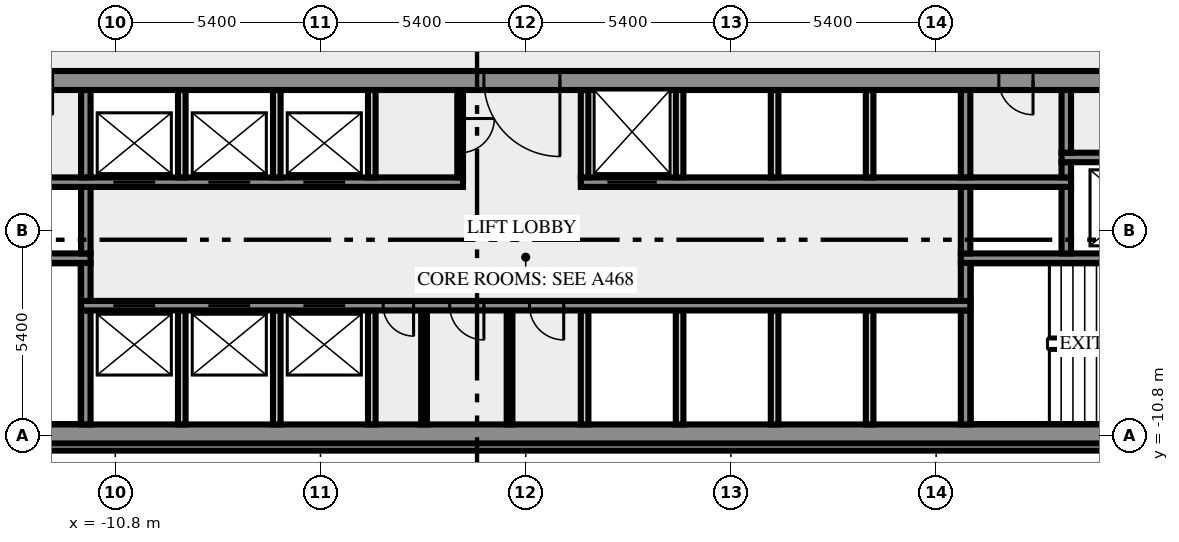
"""IFC4 building model, lengths in metres.
Left out: names, types, materials, properties, quantities, classifications, styles, units other than length and angle.
Written with IfcOpenShell. Run it as: python <this file> out.ifc"""

import sys

from ifc_helpers import new_model, si_unit, direction, frame, frame_2d, origin, place, context, subcontext, project, spatial, rectangle, extrude, element, fill, save


model = new_model("IFC4")
c1 = context("Model", 3, precision=1e-05, world=origin(), true_north=direction((0.0, 1.0)))
c2 = subcontext(c1, "Body", "Model", "MODEL_VIEW")
j1 = project(units=[si_unit("LENGTHUNIT", "METRE"), si_unit("PLANEANGLEUNIT", "RADIAN")], contexts=[c1])
p1 = place(None, origin())
s1 = spatial("IfcSite", under=j1, at=p1, CompositionType="ELEMENT")
p2 = place(p1, origin())
s2 = spatial("IfcBuilding", under=s1, at=p2, CompositionType="ELEMENT")
p3 = place(p2, frame((0.0, 0.0, 101.0)))
s3 = spatial("IfcBuildingStorey", under=s2, at=p3, CompositionType="ELEMENT", Elevation=101.0)
p4 = place(p3, frame((-17.444, -11.088, 0.0), z_axis=(0.0, 0.0, 1.0), x_axis=(1.0, 0.0, 0.0)))
e1 = element("IfcWall", 1, at=p4, inside=s3, PredefinedType="SOLIDWALL", context=c2, shape_type="SweptSolid", body=[
    extrude(rectangle(XDim=34.888, YDim=0.2, at=frame_2d((17.444, 0.0))), origin(), (0.0, 0.0, 1.0), 3.65),
])
p5 = place(p3, frame((-20.0, -10.75, 0.0), z_axis=(0.0, 0.0, 1.0), x_axis=(1.0, 0.0, 0.0)))
e2 = element("IfcWall", 2, at=p5, inside=s3, PredefinedType="SHEAR", context=c2, shape_type="SweptSolid", body=[
    extrude(rectangle(XDim=40.0, YDim=0.5, at=frame_2d((20.0, 0.0))), origin(), (0.0, 0.0, 1.0), 3.65),
])
p6 = place(p5, frame((0.8, 0.0, 1.0)))
e3 = element("IfcOpeningElement", 3, at=p6, cuts=e2, PredefinedType="OPENING", context=c2, shape_type="SweptSolid", body=[
    extrude(rectangle(XDim=1.2, YDim=1.2, at=frame_2d((0.6, 0.6))), frame((0.0, 0.26, 0.0), z_axis=(0.0, -1.0, 0.0), x_axis=(1.0, 0.0, 0.0)), (0.0, 0.0, 1.0), 0.52),
])
p7 = place(p5, frame((38.0, 0.0, 1.0)))
e4 = element("IfcOpeningElement", 4, at=p7, cuts=e2, PredefinedType="OPENING", context=c2, shape_type="SweptSolid", body=[
    extrude(rectangle(XDim=1.2, YDim=1.2, at=frame_2d((0.6, 0.6))), frame((0.0, 0.26, 0.0), z_axis=(0.0, -1.0, 0.0), x_axis=(1.0, 0.0, 0.0)), (0.0, 0.0, 1.0), 0.52),
])
p8 = place(p3, frame((-11.575, -10.5, 0.0), z_axis=(0.0, 0.0, 1.0), x_axis=(0.0, 1.0, 0.0)))
e5 = element("IfcWall", 5, at=p8, inside=s3, PredefinedType="SHEAR", context=c2, shape_type="SweptSolid", body=[
    extrude(rectangle(XDim=3.0, YDim=0.25, at=frame_2d((1.5, 0.0))), origin(), (0.0, 0.0, 1.0), 3.65),
])
for number, where, z_axis, x_axis in (
    (6, (-9.05, -10.5, 0.0), (0.0, 0.0, 1.0), (0.0, 1.0, 0.0)),
    (7, (-6.55, -10.5, 0.0), (0.0, 0.0, 1.0), (0.0, 1.0, 0.0)),
    (8, (-4.05, -10.5, 0.0), (0.0, 0.0, 1.0), (0.0, 1.0, 0.0)),
):
    element("IfcWall", number, at=place(p3, frame(where, z_axis=z_axis, x_axis=x_axis)), inside=s3, PredefinedType="SOLIDWALL", context=c2, shape_type="SweptSolid", body=[
        extrude(rectangle(XDim=3.0, YDim=0.2, at=frame_2d((1.5, 0.0))), origin(), (0.0, 0.0, 1.0), 3.65),
    ])
for number, where, z_axis, x_axis in (
    (9, (-2.675, -10.5, 0.0), (0.0, 0.0, 1.0), (0.0, 1.0, 0.0)),
    (10, (-0.425, -10.5, 0.0), (0.0, 0.0, 1.0), (0.0, 1.0, 0.0)),
):
    element("IfcWall", number, at=place(p3, frame(where, z_axis=z_axis, x_axis=x_axis)), inside=s3, PredefinedType="PARTITIONING", context=c2, shape_type="SweptSolid", body=[
        extrude(rectangle(XDim=3.0, YDim=0.15, at=frame_2d((1.5, 0.0))), origin(), (0.0, 0.0, 1.0), 3.65),
    ])
for number, where, z_axis, x_axis in (
    (11, (1.55, -10.5, 0.0), (0.0, 0.0, 1.0), (0.0, 1.0, 0.0)),
    (12, (4.05, -10.5, 0.0), (0.0, 0.0, 1.0), (0.0, 1.0, 0.0)),
    (13, (6.55, -10.5, 0.0), (0.0, 0.0, 1.0), (0.0, 1.0, 0.0)),
    (14, (9.05, -10.5, 0.0), (0.0, 0.0, 1.0), (0.0, 1.0, 0.0)),
):
    element("IfcWall", number, at=place(p3, frame(where, z_axis=z_axis, x_axis=x_axis)), inside=s3, PredefinedType="SOLIDWALL", context=c2, shape_type="SweptSolid", body=[
        extrude(rectangle(XDim=3.0, YDim=0.2, at=frame_2d((1.5, 0.0))), origin(), (0.0, 0.0, 1.0), 3.65),
    ])
p9 = place(p3, frame((11.575, -10.5, 0.0), z_axis=(0.0, 0.0, 1.0), x_axis=(0.0, 1.0, 0.0)))
e15 = element("IfcWall", 15, at=p9, inside=s3, PredefinedType="SHEAR", context=c2, shape_type="SweptSolid", body=[
    extrude(rectangle(XDim=3.0, YDim=0.25, at=frame_2d((1.5, 0.0))), origin(), (0.0, 0.0, 1.0), 3.65),
])
p10 = place(p3, frame((11.7, -7.375, 0.0), z_axis=(0.0, 0.0, 1.0), x_axis=(-1.0, 0.0, 0.0)))
e16 = element("IfcWall", 16, at=p10, inside=s3, PredefinedType="SHEAR", context=c2, shape_type="SweptSolid", body=[
    extrude(rectangle(XDim=23.4, YDim=0.25, at=frame_2d((11.7, 0.0))), origin(), (0.0, 0.0, 1.0), 3.65),
])
p11 = place(p10, frame((21.45, 0.0, 0.0)))
e17 = element("IfcOpeningElement", 17, at=p11, cuts=e16, PredefinedType="OPENING", context=c2, shape_type="SweptSolid", body=[
    extrude(rectangle(XDim=1.1, YDim=2.1, at=frame_2d((0.55, 1.05))), frame((0.0, 0.135, 0.0), z_axis=(0.0, -1.0, 0.0), x_axis=(1.0, 0.0, 0.0)), (0.0, 0.0, 1.0), 0.27),
])
p12 = place(p10, frame((18.95, 0.0, 0.0)))
e18 = element("IfcOpeningElement", 18, at=p12, cuts=e16, PredefinedType="OPENING", context=c2, shape_type="SweptSolid", body=[
    extrude(rectangle(XDim=1.1, YDim=2.1, at=frame_2d((0.55, 1.05))), frame((0.0, 0.135, 0.0), z_axis=(0.0, -1.0, 0.0), x_axis=(1.0, 0.0, 0.0)), (0.0, 0.0, 1.0), 0.27),
])
p13 = place(p10, frame((16.45, 0.0, 0.0)))
e19 = element("IfcOpeningElement", 19, at=p13, cuts=e16, PredefinedType="OPENING", context=c2, shape_type="SweptSolid", body=[
    extrude(rectangle(XDim=1.1, YDim=2.1, at=frame_2d((0.55, 1.05))), frame((0.0, 0.135, 0.0), z_axis=(0.0, -1.0, 0.0), x_axis=(1.0, 0.0, 0.0)), (0.0, 0.0, 1.0), 0.27),
])
p14 = place(p10, frame((14.65, 0.0, 0.0)))
e20 = element("IfcOpeningElement", 20, at=p14, cuts=e16, PredefinedType="OPENING", context=c2, shape_type="SweptSolid", body=[
    extrude(rectangle(XDim=0.8, YDim=2.1, at=frame_2d((0.4, 1.05))), frame((0.0, 0.135, 0.0), z_axis=(0.0, -1.0, 0.0), x_axis=(1.0, 0.0, 0.0)), (0.0, 0.0, 1.0), 0.27),
])
p15 = place(p10, frame((12.8, 0.0, 0.0)))
e21 = element("IfcOpeningElement", 21, at=p15, cuts=e16, PredefinedType="OPENING", context=c2, shape_type="SweptSolid", body=[
    extrude(rectangle(XDim=0.9, YDim=2.1, at=frame_2d((0.45, 1.05))), frame((0.0, 0.135, 0.0), z_axis=(0.0, -1.0, 0.0), x_axis=(1.0, 0.0, 0.0)), (0.0, 0.0, 1.0), 0.27),
])
p16 = place(p10, frame((10.7, 0.0, 0.0)))
e22 = element("IfcOpeningElement", 22, at=p16, cuts=e16, PredefinedType="OPENING", context=c2, shape_type="SweptSolid", body=[
    extrude(rectangle(XDim=0.9, YDim=2.1, at=frame_2d((0.45, 1.05))), frame((0.0, 0.135, 0.0), z_axis=(0.0, -1.0, 0.0), x_axis=(1.0, 0.0, 0.0)), (0.0, 0.0, 1.0), 0.27),
])
for number, where, z_axis, x_axis in (
    (23, (-11.575, -7.25, 0.0), (0.0, 0.0, 1.0), (0.0, 1.0, 0.0)),
    (24, (11.575, -7.25, 0.0), (0.0, 0.0, 1.0), (0.0, 1.0, 0.0)),
):
    element("IfcWall", number, at=place(p3, frame(where, z_axis=z_axis, x_axis=x_axis)), inside=s3, PredefinedType="SHEAR", context=c2, shape_type="SweptSolid", body=[
        extrude(rectangle(XDim=1.0, YDim=0.25, at=frame_2d((0.5, 0.0))), origin(), (0.0, 0.0, 1.0), 3.65),
    ])
p17 = place(p3, frame((-11.45, -6.125, 0.0), z_axis=(0.0, 0.0, 1.0), x_axis=(-1.0, 0.0, 0.0)))
e25 = element("IfcWall", 25, at=p17, inside=s3, PredefinedType="SHEAR", context=c2, shape_type="SweptSolid", body=[
    extrude(rectangle(XDim=8.05, YDim=0.25, at=frame_2d((4.025, 0.0))), origin(), (0.0, 0.0, 1.0), 3.65),
])
p18 = place(p17, frame((6.2, 0.0, 0.0)))
e26 = element("IfcOpeningElement", 26, at=p18, cuts=e25, PredefinedType="OPENING", context=c2, shape_type="SweptSolid", body=[
    extrude(rectangle(XDim=1.8, YDim=2.1, at=frame_2d((0.9, 1.05))), frame((0.0, 0.135, 0.0), z_axis=(0.0, -1.0, 0.0), x_axis=(1.0, 0.0, 0.0)), (0.0, 0.0, 1.0), 0.27),
])
p19 = place(p3, frame((19.5, -6.125, 0.0), z_axis=(0.0, 0.0, 1.0), x_axis=(-1.0, 0.0, 0.0)))
e27 = element("IfcWall", 27, at=p19, inside=s3, PredefinedType="SHEAR", context=c2, shape_type="SweptSolid", body=[
    extrude(rectangle(XDim=8.05, YDim=0.25, at=frame_2d((4.025, 0.0))), origin(), (0.0, 0.0, 1.0), 3.65),
])
p20 = place(p19, frame((0.05, 0.0, 0.0)))
e28 = element("IfcOpeningElement", 28, at=p20, cuts=e27, PredefinedType="OPENING", context=c2, shape_type="SweptSolid", body=[
    extrude(rectangle(XDim=1.8, YDim=2.1, at=frame_2d((0.9, 1.05))), frame((0.0, 0.135, 0.0), z_axis=(0.0, -1.0, 0.0), x_axis=(1.0, 0.0, 0.0)), (0.0, 0.0, 1.0), 0.27),
])
for number, where, z_axis, x_axis in (
    (29, (-11.575, -6.0, 0.0), (0.0, 0.0, 1.0), (0.0, 1.0, 0.0)),
    (30, (11.575, -6.0, 0.0), (0.0, 0.0, 1.0), (0.0, 1.0, 0.0)),
    (31, (14.225, -6.0, 0.0), (0.0, 0.0, 1.0), (0.0, 1.0, 0.0)),
):
    element("IfcWall", number, at=place(p3, frame(where, z_axis=z_axis, x_axis=x_axis)), inside=s3, PredefinedType="SHEAR", context=c2, shape_type="SweptSolid", body=[
        extrude(rectangle(XDim=1.75, YDim=0.25, at=frame_2d((0.875, 0.0))), origin(), (0.0, 0.0, 1.0), 3.65),
    ])
p21 = place(p3, frame((-14.35, -4.125, 0.0), z_axis=(0.0, 0.0, 1.0), x_axis=(1.0, 0.0, 0.0)))
e32 = element("IfcWall", 32, at=p21, inside=s3, PredefinedType="SHEAR", context=c2, shape_type="SweptSolid", body=[
    extrude(rectangle(XDim=12.7, YDim=0.25, at=frame_2d((6.35, 0.0))), origin(), (0.0, 0.0, 1.0), 3.65),
])
p22 = place(p21, frame((3.5, 0.0, 0.0)))
e33 = element("IfcOpeningElement", 33, at=p22, cuts=e32, PredefinedType="OPENING", context=c2, shape_type="SweptSolid", body=[
    extrude(rectangle(XDim=1.1, YDim=2.1, at=frame_2d((0.55, 1.05))), frame((0.0, 0.135, 0.0), z_axis=(0.0, -1.0, 0.0), x_axis=(1.0, 0.0, 0.0)), (0.0, 0.0, 1.0), 0.27),
])
p23 = place(p21, frame((6.0, 0.0, 0.0)))
e34 = element("IfcOpeningElement", 34, at=p23, cuts=e32, PredefinedType="OPENING", context=c2, shape_type="SweptSolid", body=[
    extrude(rectangle(XDim=1.1, YDim=2.1, at=frame_2d((0.55, 1.05))), frame((0.0, 0.135, 0.0), z_axis=(0.0, -1.0, 0.0), x_axis=(1.0, 0.0, 0.0)), (0.0, 0.0, 1.0), 0.27),
])
p24 = place(p21, frame((8.5, 0.0, 0.0)))
e35 = element("IfcOpeningElement", 35, at=p24, cuts=e32, PredefinedType="OPENING", context=c2, shape_type="SweptSolid", body=[
    extrude(rectangle(XDim=1.1, YDim=2.1, at=frame_2d((0.55, 1.05))), frame((0.0, 0.135, 0.0), z_axis=(0.0, -1.0, 0.0), x_axis=(1.0, 0.0, 0.0)), (0.0, 0.0, 1.0), 0.27),
])
p25 = place(p3, frame((1.45, -4.125, 0.0), z_axis=(0.0, 0.0, 1.0), x_axis=(1.0, 0.0, 0.0)))
e36 = element("IfcWall", 36, at=p25, inside=s3, PredefinedType="SHEAR", context=c2, shape_type="SweptSolid", body=[
    extrude(rectangle(XDim=12.9, YDim=0.25, at=frame_2d((6.45, 0.0))), origin(), (0.0, 0.0, 1.0), 3.65),
])
p26 = place(p25, frame((0.7, 0.0, 0.0)))
e37 = element("IfcOpeningElement", 37, at=p26, cuts=e36, PredefinedType="OPENING", context=c2, shape_type="SweptSolid", body=[
    extrude(rectangle(XDim=1.3, YDim=2.1, at=frame_2d((0.65, 1.05))), frame((0.0, 0.135, 0.0), z_axis=(0.0, -1.0, 0.0), x_axis=(1.0, 0.0, 0.0)), (0.0, 0.0, 1.0), 0.27),
])
p27 = place(p3, frame((-11.575, -4.0, 0.0), z_axis=(0.0, 0.0, 1.0), x_axis=(0.0, 1.0, 0.0)))
e38 = element("IfcWall", 38, at=p27, inside=s3, PredefinedType="SHEAR", context=c2, shape_type="SweptSolid", body=[
    extrude(rectangle(XDim=2.3, YDim=0.25, at=frame_2d((1.15, 0.0))), origin(), (0.0, 0.0, 1.0), 3.65),
])
for number, where, z_axis, x_axis in (
    (39, (-9.05, -4.0, 0.0), (0.0, 0.0, 1.0), (0.0, 1.0, 0.0)),
    (40, (-6.55, -4.0, 0.0), (0.0, 0.0, 1.0), (0.0, 1.0, 0.0)),
    (41, (-4.05, -4.0, 0.0), (0.0, 0.0, 1.0), (0.0, 1.0, 0.0)),
):
    element("IfcWall", number, at=place(p3, frame(where, z_axis=z_axis, x_axis=x_axis)), inside=s3, PredefinedType="SOLIDWALL", context=c2, shape_type="SweptSolid", body=[
        extrude(rectangle(XDim=2.3, YDim=0.2, at=frame_2d((1.15, 0.0))), origin(), (0.0, 0.0, 1.0), 3.65),
    ])
p28 = place(p3, frame((-1.725, -1.7, 0.0), z_axis=(0.0, 0.0, 1.0), x_axis=(0.0, -1.0, 0.0)))
e42 = element("IfcWall", 42, at=p28, inside=s3, PredefinedType="PARTITIONING", context=c2, shape_type="SweptSolid", body=[
    extrude(rectangle(XDim=2.3, YDim=0.15, at=frame_2d((1.15, 0.0))), origin(), (0.0, 0.0, 1.0), 3.65),
])
p29 = place(p28, frame((0.75, 0.0, 0.0)))
e43 = element("IfcOpeningElement", 43, at=p29, cuts=e42, PredefinedType="OPENING", context=c2, shape_type="SweptSolid", body=[
    extrude(rectangle(XDim=0.9, YDim=2.1, at=frame_2d((0.45, 1.05))), frame((0.0, 0.085, 0.0), z_axis=(0.0, -1.0, 0.0), x_axis=(1.0, 0.0, 0.0)), (0.0, 0.0, 1.0), 0.17),
])
for number, where, z_axis, x_axis in (
    (44, (1.55, -4.0, 0.0), (0.0, 0.0, 1.0), (0.0, 1.0, 0.0)),
    (45, (4.05, -4.0, 0.0), (0.0, 0.0, 1.0), (0.0, 1.0, 0.0)),
    (46, (6.55, -4.0, 0.0), (0.0, 0.0, 1.0), (0.0, 1.0, 0.0)),
    (47, (9.05, -4.0, 0.0), (0.0, 0.0, 1.0), (0.0, 1.0, 0.0)),
):
    element("IfcWall", number, at=place(p3, frame(where, z_axis=z_axis, x_axis=x_axis)), inside=s3, PredefinedType="SOLIDWALL", context=c2, shape_type="SweptSolid", body=[
        extrude(rectangle(XDim=2.3, YDim=0.2, at=frame_2d((1.15, 0.0))), origin(), (0.0, 0.0, 1.0), 3.65),
    ])
p30 = place(p3, frame((11.575, -4.0, 0.0), z_axis=(0.0, 0.0, 1.0), x_axis=(0.0, 1.0, 0.0)))
e48 = element("IfcWall", 48, at=p30, inside=s3, PredefinedType="SHEAR", context=c2, shape_type="SweptSolid", body=[
    extrude(rectangle(XDim=2.3, YDim=0.25, at=frame_2d((1.15, 0.0))), origin(), (0.0, 0.0, 1.0), 3.65),
])
p31 = place(p3, frame((14.225, -4.0, 0.0), z_axis=(0.0, 0.0, 1.0), x_axis=(0.0, 1.0, 0.0)))
e49 = element("IfcWall", 49, at=p31, inside=s3, PredefinedType="SHEAR", context=c2, shape_type="SweptSolid", body=[
    extrude(rectangle(XDim=0.4, YDim=0.25, at=frame_2d((0.2, 0.0))), origin(), (0.0, 0.0, 1.0), 3.65),
])
p32 = place(p3, frame((14.1, -3.475, 0.0), z_axis=(0.0, 0.0, 1.0), x_axis=(1.0, 0.0, 0.0)))
e50 = element("IfcWall", 50, at=p32, inside=s3, PredefinedType="SHEAR", context=c2, shape_type="SweptSolid", body=[
    extrude(rectangle(XDim=3.25, YDim=0.25, at=frame_2d((1.625, 0.0))), origin(), (0.0, 0.0, 1.0), 3.65),
])
p33 = place(p3, frame((14.225, -3.35, 0.0), z_axis=(0.0, 0.0, 1.0), x_axis=(0.0, 1.0, 0.0)))
e51 = element("IfcWall", 51, at=p33, inside=s3, PredefinedType="SHEAR", context=c2, shape_type="SweptSolid", body=[
    extrude(rectangle(XDim=1.65, YDim=0.25, at=frame_2d((0.825, 0.0))), origin(), (0.0, 0.0, 1.0), 3.65),
])
p34 = place(p3, frame((20.49, -1.45, 0.0), z_axis=(0.0, 0.0, 1.0), x_axis=(-1.0, 0.0, 0.0)))
e52 = element("IfcWall", 52, at=p34, inside=s3, PredefinedType="SHEAR", context=c2, shape_type="SweptSolid", body=[
    extrude(rectangle(XDim=40.98, YDim=0.5, at=frame_2d((20.49, 0.0))), origin(), (0.0, 0.0, 1.0), 3.65),
])
p35 = place(p34, frame((38.14, 0.0, 0.0)))
e53 = element("IfcOpeningElement", 53, at=p35, cuts=e52, PredefinedType="OPENING", context=c2, shape_type="SweptSolid", body=[
    extrude(rectangle(XDim=1.8, YDim=2.1, at=frame_2d((0.9, 1.05))), frame((0.0, 0.26, 0.0), z_axis=(0.0, -1.0, 0.0), x_axis=(1.0, 0.0, 0.0)), (0.0, 0.0, 1.0), 0.52),
])
p36 = place(p34, frame((36.728, 0.0, 0.0)))
e54 = element("IfcOpeningElement", 54, at=p36, cuts=e52, PredefinedType="OPENING", context=c2, shape_type="SweptSolid", body=[
    extrude(rectangle(XDim=0.8, YDim=2.1, at=frame_2d((0.4, 1.05))), frame((0.0, 0.26, 0.0), z_axis=(0.0, -1.0, 0.0), x_axis=(1.0, 0.0, 0.0)), (0.0, 0.0, 1.0), 0.52),
])
p37 = place(p34, frame((35.153, 0.0, 0.0)))
e55 = element("IfcOpeningElement", 55, at=p37, cuts=e52, PredefinedType="OPENING", context=c2, shape_type="SweptSolid", body=[
    extrude(rectangle(XDim=0.8, YDim=2.1, at=frame_2d((0.4, 1.05))), frame((0.0, 0.26, 0.0), z_axis=(0.0, -1.0, 0.0), x_axis=(1.0, 0.0, 0.0)), (0.0, 0.0, 1.0), 0.52),
])
p38 = place(p34, frame((32.94, 0.0, 0.0)))
e56 = element("IfcOpeningElement", 56, at=p38, cuts=e52, PredefinedType="OPENING", context=c2, shape_type="SweptSolid", body=[
    extrude(rectangle(XDim=0.9, YDim=2.1, at=frame_2d((0.45, 1.05))), frame((0.0, 0.26, 0.0), z_axis=(0.0, -1.0, 0.0), x_axis=(1.0, 0.0, 0.0)), (0.0, 0.0, 1.0), 0.52),
])
p39 = place(p34, frame((19.59, 0.0, 0.0)))
e57 = element("IfcOpeningElement", 57, at=p39, cuts=e52, PredefinedType="OPENING", context=c2, shape_type="SweptSolid", body=[
    extrude(rectangle(XDim=2.0, YDim=2.1, at=frame_2d((1.0, 1.05))), frame((0.0, 0.26, 0.0), z_axis=(0.0, -1.0, 0.0), x_axis=(1.0, 0.0, 0.0)), (0.0, 0.0, 1.0), 0.52),
])
p40 = place(p34, frame((7.14, 0.0, 0.0)))
e58 = element("IfcOpeningElement", 58, at=p40, cuts=e52, PredefinedType="OPENING", context=c2, shape_type="SweptSolid", body=[
    extrude(rectangle(XDim=0.9, YDim=2.1, at=frame_2d((0.45, 1.05))), frame((0.0, 0.26, 0.0), z_axis=(0.0, -1.0, 0.0), x_axis=(1.0, 0.0, 0.0)), (0.0, 0.0, 1.0), 0.52),
])
p41 = place(p34, frame((4.19, 0.0, 0.0)))
e59 = element("IfcOpeningElement", 59, at=p41, cuts=e52, PredefinedType="OPENING", context=c2, shape_type="SweptSolid", body=[
    extrude(rectangle(XDim=0.9, YDim=2.1, at=frame_2d((0.45, 1.05))), frame((0.0, 0.26, 0.0), z_axis=(0.0, -1.0, 0.0), x_axis=(1.0, 0.0, 0.0)), (0.0, 0.0, 1.0), 0.52),
])
p42 = place(p34, frame((1.04, 0.0, 0.0)))
e60 = element("IfcOpeningElement", 60, at=p42, cuts=e52, PredefinedType="OPENING", context=c2, shape_type="SweptSolid", body=[
    extrude(rectangle(XDim=1.8, YDim=2.1, at=frame_2d((0.9, 1.05))), frame((0.0, 0.26, 0.0), z_axis=(0.0, -1.0, 0.0), x_axis=(1.0, 0.0, 0.0)), (0.0, 0.0, 1.0), 0.52),
])
p43 = place(p11, origin())
e61 = element("IfcDoor", 61, at=p43, inside=s3, OperationType="DOUBLE_DOOR_SLIDING", PredefinedType="DOOR", context=c2, shape_type="SweptSolid", body=[
    extrude(rectangle(XDim=1.1, YDim=2.1, at=frame_2d((0.55, 1.05))), frame((0.0, 0.025, 0.0), z_axis=(0.0, -1.0, 0.0), x_axis=(1.0, 0.0, 0.0)), (0.0, 0.0, 1.0), 0.05),
])
fill(e17, e61)
p44 = place(p12, origin())
e62 = element("IfcDoor", 62, at=p44, inside=s3, OperationType="DOUBLE_DOOR_SLIDING", PredefinedType="DOOR", context=c2, shape_type="SweptSolid", body=[
    extrude(rectangle(XDim=1.1, YDim=2.1, at=frame_2d((0.55, 1.05))), frame((0.0, 0.025, 0.0), z_axis=(0.0, -1.0, 0.0), x_axis=(1.0, 0.0, 0.0)), (0.0, 0.0, 1.0), 0.05),
])
fill(e18, e62)
p45 = place(p13, origin())
e63 = element("IfcDoor", 63, at=p45, inside=s3, OperationType="DOUBLE_DOOR_SLIDING", PredefinedType="DOOR", context=c2, shape_type="SweptSolid", body=[
    extrude(rectangle(XDim=1.1, YDim=2.1, at=frame_2d((0.55, 1.05))), frame((0.0, 0.025, 0.0), z_axis=(0.0, -1.0, 0.0), x_axis=(1.0, 0.0, 0.0)), (0.0, 0.0, 1.0), 0.05),
])
fill(e19, e63)
p46 = place(p14, origin())
e64 = element("IfcDoor", 64, at=p46, inside=s3, OperationType="SINGLE_SWING_RIGHT", PredefinedType="DOOR", context=c2, shape_type="SweptSolid", body=[
    extrude(rectangle(XDim=0.8, YDim=2.1, at=frame_2d((0.4, 1.05))), frame((0.0, 0.025, 0.0), z_axis=(0.0, -1.0, 0.0), x_axis=(1.0, 0.0, 0.0)), (0.0, 0.0, 1.0), 0.05),
])
fill(e20, e64)
p47 = place(p15, origin())
e65 = element("IfcDoor", 65, at=p47, inside=s3, OperationType="SINGLE_SWING_RIGHT", PredefinedType="DOOR", context=c2, shape_type="SweptSolid", body=[
    extrude(rectangle(XDim=0.9, YDim=2.1, at=frame_2d((0.45, 1.05))), frame((0.0, 0.025, 0.0), z_axis=(0.0, -1.0, 0.0), x_axis=(1.0, 0.0, 0.0)), (0.0, 0.0, 1.0), 0.05),
])
fill(e21, e65)
p48 = place(p16, origin())
e66 = element("IfcDoor", 66, at=p48, inside=s3, OperationType="SINGLE_SWING_LEFT", PredefinedType="DOOR", context=c2, shape_type="SweptSolid", body=[
    extrude(rectangle(XDim=0.9, YDim=2.1, at=frame_2d((0.45, 1.05))), frame((0.0, 0.025, 0.0), z_axis=(0.0, -1.0, 0.0), x_axis=(1.0, 0.0, 0.0)), (0.0, 0.0, 1.0), 0.05),
])
fill(e22, e66)
p49 = place(p22, origin())
e67 = element("IfcDoor", 67, at=p49, inside=s3, OperationType="DOUBLE_DOOR_SLIDING", PredefinedType="DOOR", context=c2, shape_type="SweptSolid", body=[
    extrude(rectangle(XDim=1.1, YDim=2.1, at=frame_2d((0.55, 1.05))), frame((0.0, 0.025, 0.0), z_axis=(0.0, -1.0, 0.0), x_axis=(1.0, 0.0, 0.0)), (0.0, 0.0, 1.0), 0.05),
])
fill(e33, e67)
p50 = place(p23, origin())
e68 = element("IfcDoor", 68, at=p50, inside=s3, OperationType="DOUBLE_DOOR_SLIDING", PredefinedType="DOOR", context=c2, shape_type="SweptSolid", body=[
    extrude(rectangle(XDim=1.1, YDim=2.1, at=frame_2d((0.55, 1.05))), frame((0.0, 0.025, 0.0), z_axis=(0.0, -1.0, 0.0), x_axis=(1.0, 0.0, 0.0)), (0.0, 0.0, 1.0), 0.05),
])
fill(e34, e68)
p51 = place(p24, origin())
e69 = element("IfcDoor", 69, at=p51, inside=s3, OperationType="DOUBLE_DOOR_SLIDING", PredefinedType="DOOR", context=c2, shape_type="SweptSolid", body=[
    extrude(rectangle(XDim=1.1, YDim=2.1, at=frame_2d((0.55, 1.05))), frame((0.0, 0.025, 0.0), z_axis=(0.0, -1.0, 0.0), x_axis=(1.0, 0.0, 0.0)), (0.0, 0.0, 1.0), 0.05),
])
fill(e35, e69)
p52 = place(p26, origin())
e70 = element("IfcDoor", 70, at=p52, inside=s3, OperationType="DOUBLE_DOOR_SLIDING", PredefinedType="DOOR", context=c2, shape_type="SweptSolid", body=[
    extrude(rectangle(XDim=1.3, YDim=2.1, at=frame_2d((0.65, 1.05))), frame((0.0, 0.025, 0.0), z_axis=(0.0, -1.0, 0.0), x_axis=(1.0, 0.0, 0.0)), (0.0, 0.0, 1.0), 0.05),
])
fill(e37, e70)
p53 = place(p29, origin())
e71 = element("IfcDoor", 71, at=p53, inside=s3, OperationType="SINGLE_SWING_RIGHT", PredefinedType="DOOR", context=c2, shape_type="SweptSolid", body=[
    extrude(rectangle(XDim=0.9, YDim=2.1, at=frame_2d((0.45, 1.05))), frame((0.0, 0.025, 0.0), z_axis=(0.0, -1.0, 0.0), x_axis=(1.0, 0.0, 0.0)), (0.0, 0.0, 1.0), 0.05),
])
fill(e43, e71)
p54 = place(p39, origin())
e72 = element("IfcDoor", 72, at=p54, inside=s3, OperationType="DOUBLE_DOOR_SINGLE_SWING", PredefinedType="DOOR", context=c2, shape_type="SweptSolid", body=[
    extrude(rectangle(XDim=2.0, YDim=2.1, at=frame_2d((1.0, 1.05))), frame((0.0, 0.025, 0.0), z_axis=(0.0, -1.0, 0.0), x_axis=(1.0, 0.0, 0.0)), (0.0, 0.0, 1.0), 0.05),
])
fill(e57, e72)
p55 = place(p40, origin())
e73 = element("IfcDoor", 73, at=p55, inside=s3, OperationType="SINGLE_SWING_LEFT", PredefinedType="DOOR", context=c2, shape_type="SweptSolid", body=[
    extrude(rectangle(XDim=0.9, YDim=2.1, at=frame_2d((0.45, 1.05))), frame((0.0, 0.025, 0.0), z_axis=(0.0, -1.0, 0.0), x_axis=(1.0, 0.0, 0.0)), (0.0, 0.0, 1.0), 0.05),
])
fill(e58, e73)
save(model, sys.argv[1])
